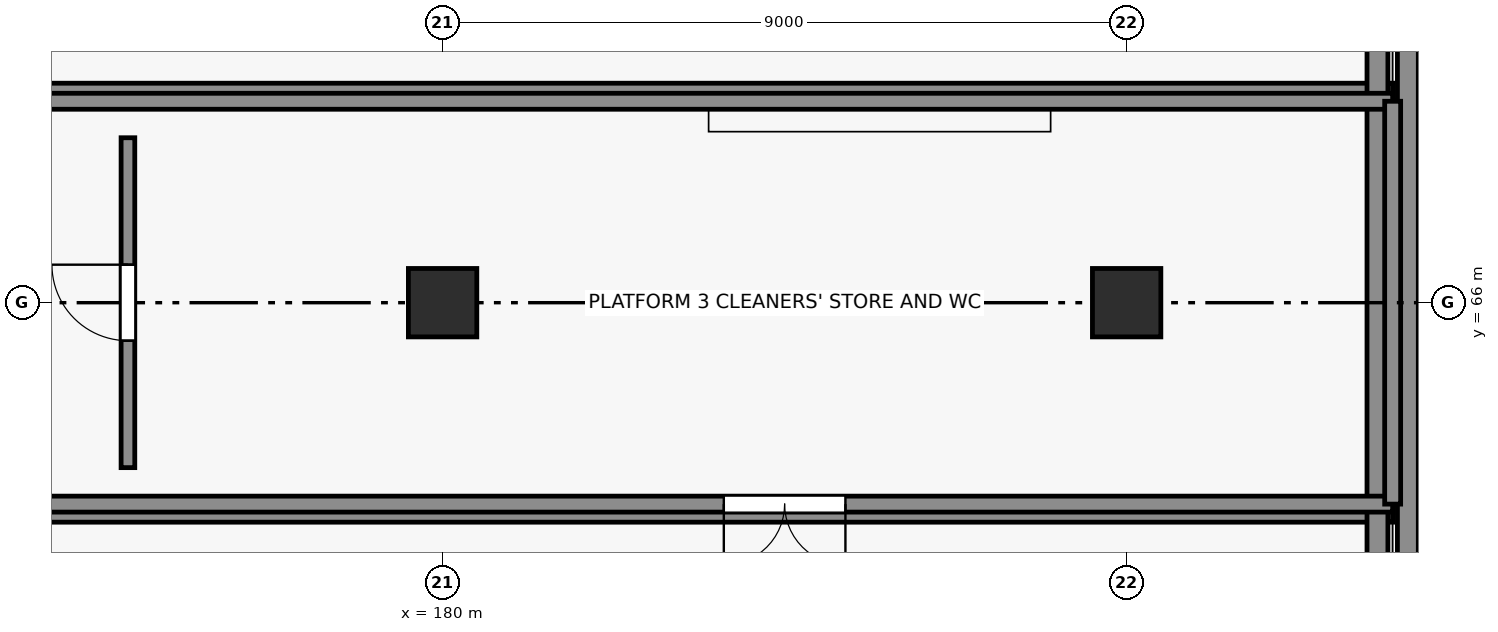
"""IFC4 building model, lengths in metres.
Left out: names, types, materials, properties, quantities, classifications, styles, units other than length and angle.
Written with IfcOpenShell. Run it as: python <this file> out.ifc"""

import sys

from ifc_helpers import new_model, si_unit, direction, frame, frame_2d, origin, origin_2d, place, context, subcontext, project, spatial, rectangle, extrude, element, fill, save


model = new_model("IFC4")
c1 = context("Model", 3, precision=1e-05, world=origin(), true_north=direction((0.0, 1.0)))
c2 = subcontext(c1, "Body", "Model", "MODEL_VIEW")
j1 = project(units=[si_unit("LENGTHUNIT", "METRE"), si_unit("PLANEANGLEUNIT", "RADIAN")], contexts=[c1])
p1 = place(None, origin())
s1 = spatial("IfcSite", under=j1, at=p1, CompositionType="ELEMENT")
p2 = place(p1, origin())
s2 = spatial("IfcBuilding", under=s1, at=p2, CompositionType="ELEMENT")
p3 = place(p2, origin())
s3 = spatial("IfcBuildingStorey", under=s2, at=p3, CompositionType="ELEMENT", Elevation=0.0)
for number, where, z_axis, x_axis in (
    (1, (141.5, 63.25, 0.0), (0.0, 0.0, 1.0), (1.0, 0.0, 0.0)),
    (2, (141.5, 68.75, 0.0), (0.0, 0.0, 1.0), (1.0, 0.0, 0.0)),
):
    element("IfcWall", number, at=place(p3, frame(where, z_axis=z_axis, x_axis=x_axis)), inside=s3, PredefinedType="SOLIDWALL", context=c2, shape_type="SweptSolid", body=[
        extrude(rectangle(XDim=51.0, YDim=0.275, at=frame_2d((25.5, 0.0))), origin(), (0.0, 0.0, 1.0), 0.675),
    ])
for number, where, z_axis, x_axis in (
    (3, (192.3, 62.25, 0.0), (0.0, 0.0, 1.0), (0.0, 1.0, 0.0)),
    (4, (192.7, 62.25, 0.0), (0.0, 0.0, 1.0), (0.0, 1.0, 0.0)),
):
    element("IfcWall", number, at=place(p3, frame(where, z_axis=z_axis, x_axis=x_axis)), inside=s3, PredefinedType="SOLIDWALL", context=c2, shape_type="SweptSolid", body=[
        extrude(rectangle(XDim=7.5, YDim=0.275, at=frame_2d((3.75, 0.0))), origin(), (0.0, 0.0, 1.0), 0.675),
    ])
for number, where, z_axis, x_axis in (
    (5, (180.0, 66.0, 0.0), (0.0, 0.0, 1.0), (1.0, 0.0, 0.0)),
    (6, (189.0, 66.0, 0.0), (0.0, 0.0, 1.0), (1.0, 0.0, 0.0)),
):
    element("IfcColumn", number, at=place(p3, frame(where, z_axis=z_axis, x_axis=x_axis)), inside=s3, PredefinedType="COLUMN", context=c2, shape_type="SweptSolid", body=[
        extrude(rectangle(XDim=0.9, YDim=0.9, at=origin_2d()), origin(), (0.0, 0.0, 1.0), 4.8),
    ])
p4 = place(p3, frame((192.5, 63.35, 0.915), z_axis=(0.0, 0.0, 1.0), x_axis=(-1.0, 0.0, 0.0)))
e7 = element("IfcWall", 7, at=p4, inside=s3, PredefinedType="SOLIDWALL", context=c2, shape_type="SweptSolid", body=[
    extrude(rectangle(XDim=51.0, YDim=0.21, at=frame_2d((25.5, 0.0))), origin(), (0.0, 0.0, 1.0), 3.185),
])
p5 = place(p4, frame((25.2, 0.0, 0.0)))
e8 = element("IfcOpeningElement", 8, at=p5, cuts=e7, PredefinedType="OPENING", context=c2, shape_type="SweptSolid", body=[
    extrude(rectangle(XDim=1.6, YDim=2.3, at=frame_2d((0.8, 1.15))), frame((0.0, 0.115, 0.0), z_axis=(0.0, -1.0, 0.0), x_axis=(1.0, 0.0, 0.0)), (0.0, 0.0, 1.0), 0.23),
])
p6 = place(p4, frame((7.2, 0.0, 0.0)))
e9 = element("IfcOpeningElement", 9, at=p6, cuts=e7, PredefinedType="OPENING", context=c2, shape_type="SweptSolid", body=[
    extrude(rectangle(XDim=1.6, YDim=2.3, at=frame_2d((0.8, 1.15))), frame((0.0, 0.115, 0.0), z_axis=(0.0, -1.0, 0.0), x_axis=(1.0, 0.0, 0.0)), (0.0, 0.0, 1.0), 0.23),
])
p7 = place(p4, frame((36.0, 0.0, 0.9)))
e10 = element("IfcOpeningElement", 10, at=p7, cuts=e7, PredefinedType="OPENING", context=c2, shape_type="SweptSolid", body=[
    extrude(rectangle(XDim=4.2, YDim=1.5, at=frame_2d((2.1, 0.75))), frame((0.0, 0.115, 0.0), z_axis=(0.0, -1.0, 0.0), x_axis=(1.0, 0.0, 0.0)), (0.0, 0.0, 1.0), 0.23),
])
p8 = place(p3, frame((141.5, 68.65, 0.915), z_axis=(0.0, 0.0, 1.0), x_axis=(1.0, 0.0, 0.0)))
e11 = element("IfcWall", 11, at=p8, inside=s3, PredefinedType="SOLIDWALL", context=c2, shape_type="SweptSolid", body=[
    extrude(rectangle(XDim=51.0, YDim=0.21, at=frame_2d((25.5, 0.0))), origin(), (0.0, 0.0, 1.0), 3.185),
])
p9 = place(p8, frame((15.2, 0.0, 0.0)))
e12 = element("IfcOpeningElement", 12, at=p9, cuts=e11, PredefinedType="OPENING", context=c2, shape_type="SweptSolid", body=[
    extrude(rectangle(XDim=1.6, YDim=2.3, at=frame_2d((0.8, 1.15))), frame((0.0, 0.115, 0.0), z_axis=(0.0, -1.0, 0.0), x_axis=(1.0, 0.0, 0.0)), (0.0, 0.0, 1.0), 0.23),
])
p10 = place(p8, frame((24.0, 0.0, 0.9)))
e13 = element("IfcOpeningElement", 13, at=p10, cuts=e11, PredefinedType="OPENING", context=c2, shape_type="SweptSolid", body=[
    extrude(rectangle(XDim=4.2, YDim=1.5, at=frame_2d((2.1, 0.75))), frame((0.0, 0.115, 0.0), z_axis=(0.0, -1.0, 0.0), x_axis=(1.0, 0.0, 0.0)), (0.0, 0.0, 1.0), 0.23),
])
p11 = place(p3, frame((192.5, 68.65, 0.915), z_axis=(0.0, 0.0, 1.0), x_axis=(0.0, -1.0, 0.0)))
e14 = element("IfcWall", 14, at=p11, inside=s3, PredefinedType="SOLIDWALL", context=c2, shape_type="SweptSolid", body=[
    extrude(rectangle(XDim=5.3, YDim=0.21, at=frame_2d((2.65, 0.0))), origin(), (0.0, 0.0, 1.0), 3.185),
])
p12 = place(p3, frame((175.86, 63.83, 0.915), z_axis=(0.0, 0.0, 1.0), x_axis=(0.0, 1.0, 0.0)))
e15 = element("IfcWall", 15, at=p12, inside=s3, PredefinedType="PARTITIONING", context=c2, shape_type="SweptSolid", body=[
    extrude(rectangle(XDim=4.34, YDim=0.18, at=frame_2d((2.17, 0.0))), origin(), (0.0, 0.0, 1.0), 3.435),
])
p13 = place(p12, frame((1.67, 0.0, 0.0)))
e16 = element("IfcOpeningElement", 16, at=p13, cuts=e15, PredefinedType="OPENING", context=c2, shape_type="SweptSolid", body=[
    extrude(rectangle(XDim=1.0, YDim=2.15, at=frame_2d((0.5, 1.075))), frame((0.0, 0.1, 0.0), z_axis=(0.0, -1.0, 0.0), x_axis=(1.0, 0.0, 0.0)), (0.0, 0.0, 1.0), 0.2),
])
p14 = place(p6, origin())
e17 = element("IfcDoor", 17, at=p14, inside=s3, OperationType="DOUBLE_DOOR_SINGLE_SWING", PredefinedType="DOOR", context=c2, shape_type="SweptSolid", body=[
    extrude(rectangle(XDim=1.6, YDim=2.3, at=frame_2d((0.8, 1.15))), frame((0.0, 0.025, 0.0), z_axis=(0.0, -1.0, 0.0), x_axis=(1.0, 0.0, 0.0)), (0.0, 0.0, 1.0), 0.05),
])
fill(e9, e17)
p15 = place(p13, origin())
e18 = element("IfcDoor", 18, at=p15, inside=s3, OperationType="SINGLE_SWING_RIGHT", PredefinedType="DOOR", context=c2, shape_type="SweptSolid", body=[
    extrude(rectangle(XDim=1.0, YDim=2.15, at=frame_2d((0.5, 1.075))), frame((0.0, 0.025, 0.0), z_axis=(0.0, -1.0, 0.0), x_axis=(1.0, 0.0, 0.0)), (0.0, 0.0, 1.0), 0.05),
])
fill(e16, e18)
save(model, sys.argv[1])
